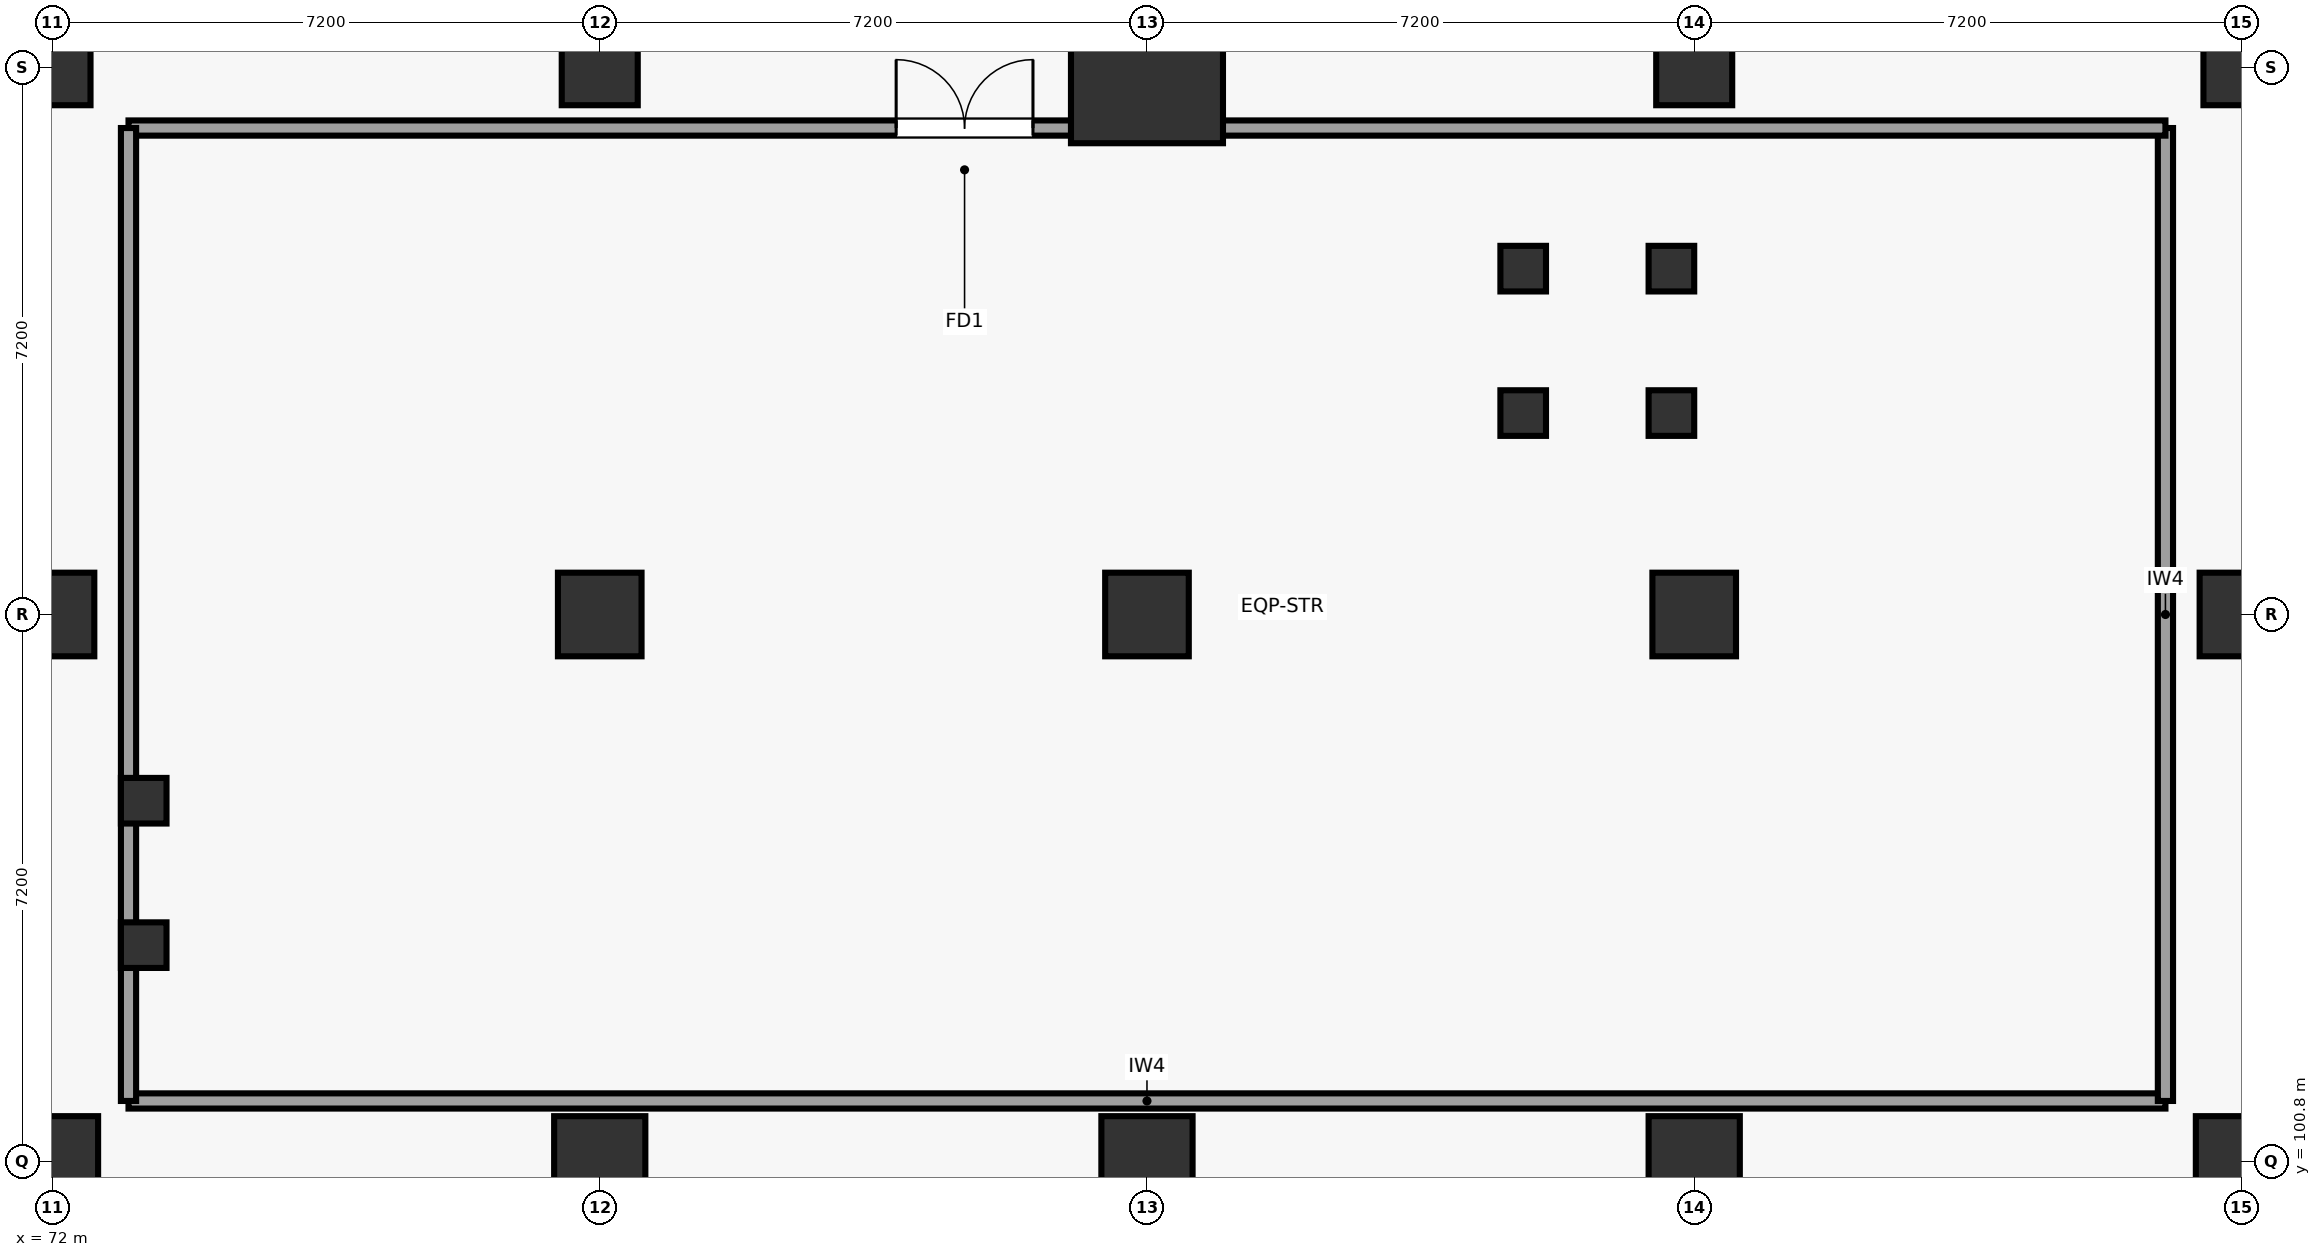
"""IFC4 building model, lengths in metres.
Left out: names, types, materials, properties, quantities, classifications, styles, units other than length and angle.
Written with IfcOpenShell. Run it as: python <this file> out.ifc"""

import sys

from ifc_helpers import new_model, si_unit, direction, frame, frame_2d, origin, origin_2d, place, context, subcontext, project, spatial, rectangle, circle, extrude, element, fill, save


model = new_model("IFC4")
c1 = context("Model", 3, precision=1e-05, world=origin(), true_north=direction((0.0, 1.0)))
c2 = subcontext(c1, "Body", "Model", "MODEL_VIEW")
j1 = project(units=[si_unit("LENGTHUNIT", "METRE"), si_unit("PLANEANGLEUNIT", "RADIAN")], contexts=[c1])
p1 = place(None, origin())
s1 = spatial("IfcSite", under=j1, at=p1, CompositionType="ELEMENT")
p2 = place(p1, origin())
s2 = spatial("IfcBuilding", under=s1, at=p2, CompositionType="ELEMENT")
p3 = place(p2, frame((0.0, 0.0, -5.4)))
s3 = spatial("IfcBuildingStorey", under=s2, at=p3, CompositionType="ELEMENT", Elevation=-5.4)
p4 = place(p3, frame((72.0, 100.8, 0.0), z_axis=(0.0, 0.0, 1.0), x_axis=(1.0, 0.0, 0.0)))
e1 = element("IfcColumn", 1, at=p4, inside=s3, PredefinedType="COLUMN", context=c2, shape_type="SweptSolid", body=[
    extrude(circle(Radius=0.6, at=origin_2d()), origin(), (0.0, 0.0, 1.0), 5.4),
])
p5 = place(p3, frame((72.0, 108.0, 0.0), z_axis=(0.0, 0.0, 1.0), x_axis=(1.0, 0.0, 0.0)))
e2 = element("IfcColumn", 2, at=p5, inside=s3, PredefinedType="COLUMN", context=c2, shape_type="SweptSolid", body=[
    extrude(rectangle(XDim=1.1, YDim=1.1, at=origin_2d()), origin(), (0.0, 0.0, 1.0), 5.4),
])
p6 = place(p3, frame((72.0, 115.2, 0.0), z_axis=(0.0, 0.0, 1.0), x_axis=(1.0, 0.0, 0.0)))
e3 = element("IfcColumn", 3, at=p6, inside=s3, PredefinedType="COLUMN", context=c2, shape_type="SweptSolid", body=[
    extrude(circle(Radius=0.5, at=origin_2d()), origin(), (0.0, 0.0, 1.0), 5.4),
])
p7 = place(p3, frame((79.2, 100.8, 0.0), z_axis=(0.0, 0.0, 1.0), x_axis=(1.0, 0.0, 0.0)))
e4 = element("IfcColumn", 4, at=p7, inside=s3, PredefinedType="COLUMN", context=c2, shape_type="SweptSolid", body=[
    extrude(circle(Radius=0.6, at=origin_2d()), origin(), (0.0, 0.0, 1.0), 5.4),
])
p8 = place(p3, frame((79.2, 108.0, 0.0), z_axis=(0.0, 0.0, 1.0), x_axis=(1.0, 0.0, 0.0)))
e5 = element("IfcColumn", 5, at=p8, inside=s3, PredefinedType="COLUMN", context=c2, shape_type="SweptSolid", body=[
    extrude(rectangle(XDim=1.1, YDim=1.1, at=origin_2d()), origin(), (0.0, 0.0, 1.0), 5.4),
])
p9 = place(p3, frame((79.2, 115.2, 0.0), z_axis=(0.0, 0.0, 1.0), x_axis=(1.0, 0.0, 0.0)))
e6 = element("IfcColumn", 6, at=p9, inside=s3, PredefinedType="COLUMN", context=c2, shape_type="SweptSolid", body=[
    extrude(rectangle(XDim=1.0, YDim=1.0, at=origin_2d()), origin(), (0.0, 0.0, 1.0), 5.4),
])
p10 = place(p3, frame((86.4, 100.8, 0.0), z_axis=(0.0, 0.0, 1.0), x_axis=(1.0, 0.0, 0.0)))
e7 = element("IfcColumn", 7, at=p10, inside=s3, PredefinedType="COLUMN", context=c2, shape_type="SweptSolid", body=[
    extrude(circle(Radius=0.6, at=origin_2d()), origin(), (0.0, 0.0, 1.0), 5.4),
])
p11 = place(p3, frame((86.4, 108.0, 0.0), z_axis=(0.0, 0.0, 1.0), x_axis=(1.0, 0.0, 0.0)))
e8 = element("IfcColumn", 8, at=p11, inside=s3, PredefinedType="COLUMN", context=c2, shape_type="SweptSolid", body=[
    extrude(rectangle(XDim=1.1, YDim=1.1, at=origin_2d()), origin(), (0.0, 0.0, 1.0), 5.4),
])
p12 = place(p3, frame((86.4, 115.2, 0.0), z_axis=(0.0, 0.0, 1.0), x_axis=(1.0, 0.0, 0.0)))
e9 = element("IfcColumn", 9, at=p12, inside=s3, PredefinedType="COLUMN", context=c2, shape_type="SweptSolid", body=[
    extrude(circle(Radius=1.0, at=origin_2d()), origin(), (0.0, 0.0, 1.0), 5.4),
])
p13 = place(p3, frame((93.6, 100.8, 0.0), z_axis=(0.0, 0.0, 1.0), x_axis=(1.0, 0.0, 0.0)))
e10 = element("IfcColumn", 10, at=p13, inside=s3, PredefinedType="COLUMN", context=c2, shape_type="SweptSolid", body=[
    extrude(circle(Radius=0.6, at=origin_2d()), origin(), (0.0, 0.0, 1.0), 5.4),
])
p14 = place(p3, frame((93.6, 108.0, 0.0), z_axis=(0.0, 0.0, 1.0), x_axis=(1.0, 0.0, 0.0)))
e11 = element("IfcColumn", 11, at=p14, inside=s3, PredefinedType="COLUMN", context=c2, shape_type="SweptSolid", body=[
    extrude(rectangle(XDim=1.1, YDim=1.1, at=origin_2d()), origin(), (0.0, 0.0, 1.0), 5.4),
])
p15 = place(p3, frame((93.6, 115.2, 0.0), z_axis=(0.0, 0.0, 1.0), x_axis=(1.0, 0.0, 0.0)))
e12 = element("IfcColumn", 12, at=p15, inside=s3, PredefinedType="COLUMN", context=c2, shape_type="SweptSolid", body=[
    extrude(rectangle(XDim=1.0, YDim=1.0, at=origin_2d()), origin(), (0.0, 0.0, 1.0), 5.4),
])
p16 = place(p3, frame((100.8, 100.8, 0.0), z_axis=(0.0, 0.0, 1.0), x_axis=(1.0, 0.0, 0.0)))
e13 = element("IfcColumn", 13, at=p16, inside=s3, PredefinedType="COLUMN", context=c2, shape_type="SweptSolid", body=[
    extrude(circle(Radius=0.6, at=origin_2d()), origin(), (0.0, 0.0, 1.0), 5.4),
])
p17 = place(p3, frame((100.8, 108.0, 0.0), z_axis=(0.0, 0.0, 1.0), x_axis=(1.0, 0.0, 0.0)))
e14 = element("IfcColumn", 14, at=p17, inside=s3, PredefinedType="COLUMN", context=c2, shape_type="SweptSolid", body=[
    extrude(rectangle(XDim=1.1, YDim=1.1, at=origin_2d()), origin(), (0.0, 0.0, 1.0), 5.4),
])
p18 = place(p3, frame((100.8, 115.2, 0.0), z_axis=(0.0, 0.0, 1.0), x_axis=(1.0, 0.0, 0.0)))
e15 = element("IfcColumn", 15, at=p18, inside=s3, PredefinedType="COLUMN", context=c2, shape_type="SweptSolid", body=[
    extrude(circle(Radius=0.5, at=origin_2d()), origin(), (0.0, 0.0, 1.0), 5.4),
])
for number, where, z_axis, x_axis in (
    (16, (73.2, 103.65, 0.0), (0.0, 0.0, 1.0), (1.0, 0.0, 0.0)),
    (17, (73.2, 105.55, 0.0), (0.0, 0.0, 1.0), (1.0, 0.0, 0.0)),
    (18, (91.35, 110.65, 0.0), (0.0, 0.0, 1.0), (1.0, 0.0, 0.0)),
    (19, (93.3, 110.65, 0.0), (0.0, 0.0, 1.0), (1.0, 0.0, 0.0)),
    (20, (91.35, 112.55, 0.0), (0.0, 0.0, 1.0), (1.0, 0.0, 0.0)),
    (21, (93.3, 112.55, 0.0), (0.0, 0.0, 1.0), (1.0, 0.0, 0.0)),
):
    element("IfcColumn", number, at=place(p3, frame(where, z_axis=z_axis, x_axis=x_axis)), inside=s3, PredefinedType="COLUMN", context=c2, shape_type="SweptSolid", body=[
        extrude(rectangle(XDim=0.6, YDim=0.6, at=origin_2d()), origin(), (0.0, 0.0, 1.0), 5.4),
    ])
p19 = place(p3, frame((73.0, 101.6, 0.0), z_axis=(0.0, 0.0, 1.0), x_axis=(1.0, 0.0, 0.0)))
e22 = element("IfcWall", 22, at=p19, inside=s3, PredefinedType="PARTITIONING", context=c2, shape_type="SweptSolid", body=[
    extrude(rectangle(XDim=26.8, YDim=0.2, at=frame_2d((13.4, 0.0))), origin(), (0.0, 0.0, 1.0), 4.04),
])
p20 = place(p3, frame((99.8, 101.6, 0.0), z_axis=(0.0, 0.0, 1.0), x_axis=(0.0, 1.0, 0.0)))
e23 = element("IfcWall", 23, at=p20, inside=s3, PredefinedType="PARTITIONING", context=c2, shape_type="SweptSolid", body=[
    extrude(rectangle(XDim=12.8, YDim=0.2, at=frame_2d((6.4, 0.0))), origin(), (0.0, 0.0, 1.0), 4.04),
])
p21 = place(p3, frame((99.8, 114.4, 0.0), z_axis=(0.0, 0.0, 1.0), x_axis=(-1.0, 0.0, 0.0)))
e24 = element("IfcWall", 24, at=p21, inside=s3, PredefinedType="PARTITIONING", context=c2, shape_type="SweptSolid", body=[
    extrude(rectangle(XDim=26.8, YDim=0.2, at=frame_2d((13.4, 0.0))), origin(), (0.0, 0.0, 1.0), 4.04),
])
p22 = place(p21, frame((14.9, 0.0, 0.0)))
e25 = element("IfcOpeningElement", 25, at=p22, cuts=e24, PredefinedType="OPENING", context=c2, shape_type="SweptSolid", body=[
    extrude(rectangle(XDim=1.8, YDim=2.3, at=frame_2d((0.9, 1.15))), frame((0.0, 0.11, 0.0), z_axis=(0.0, -1.0, 0.0), x_axis=(1.0, 0.0, 0.0)), (0.0, 0.0, 1.0), 0.22),
])
p23 = place(p3, frame((73.0, 114.4, 0.0), z_axis=(0.0, 0.0, 1.0), x_axis=(0.0, -1.0, 0.0)))
e26 = element("IfcWall", 26, at=p23, inside=s3, PredefinedType="PARTITIONING", context=c2, shape_type="SweptSolid", body=[
    extrude(rectangle(XDim=12.8, YDim=0.2, at=frame_2d((6.4, 0.0))), origin(), (0.0, 0.0, 1.0), 4.04),
])
p24 = place(p22, frame((1.8, 0.0, 0.0), z_axis=(0.0, 0.0, 1.0), x_axis=(-1.0, 0.0, 0.0)))
e27 = element("IfcDoor", 27, at=p24, inside=s3, OperationType="DOUBLE_DOOR_SINGLE_SWING", PredefinedType="DOOR", context=c2, shape_type="SweptSolid", body=[
    extrude(rectangle(XDim=1.8, YDim=2.3, at=frame_2d((0.9, 1.15))), frame((0.0, 0.025, 0.0), z_axis=(0.0, -1.0, 0.0), x_axis=(1.0, 0.0, 0.0)), (0.0, 0.0, 1.0), 0.05),
])
fill(e25, e27)
save(model, sys.argv[1])
